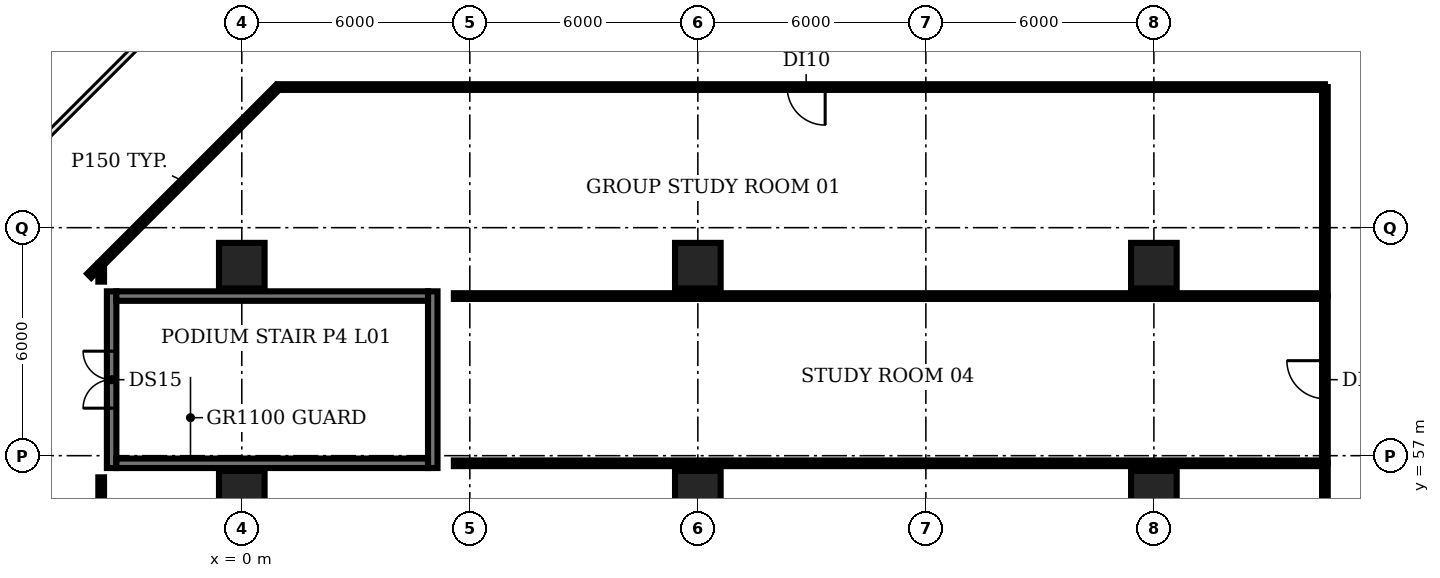
"""IFC4 building model, lengths in metres.
Left out: names, types, materials, properties, quantities, classifications, styles, units other than length and angle.
Written with IfcOpenShell. Run it as: python <this file> out.ifc"""

import sys

from ifc_helpers import new_model, si_unit, direction, frame, frame_2d, origin, origin_2d, place, context, subcontext, project, spatial, rectangle, extrude, element, fill, save


model = new_model("IFC4")
c1 = context("Model", 3, precision=1e-05, world=origin(), true_north=direction((0.0, 1.0)))
c2 = subcontext(c1, "Body", "Model", "MODEL_VIEW")
j1 = project(units=[si_unit("LENGTHUNIT", "METRE"), si_unit("PLANEANGLEUNIT", "RADIAN")], contexts=[c1])
p1 = place(None, origin())
s1 = spatial("IfcSite", under=j1, at=p1, CompositionType="ELEMENT")
p2 = place(p1, origin())
s2 = spatial("IfcBuilding", under=s1, at=p2, CompositionType="ELEMENT")
p3 = place(p2, frame((0.0, 0.0, 6.0)))
s3 = spatial("IfcBuildingStorey", under=s2, at=p3, CompositionType="ELEMENT", Elevation=6.0)
for number, where, z_axis, x_axis in (
    (1, (0.0, 56.0, 0.0), (0.0, 0.0, 1.0), (1.0, 0.0, 0.0)),
    (2, (0.0, 62.0, 0.0), (0.0, 0.0, 1.0), (1.0, 0.0, 0.0)),
    (3, (12.0, 56.0, 0.0), (0.0, 0.0, 1.0), (1.0, 0.0, 0.0)),
    (4, (12.0, 62.0, 0.0), (0.0, 0.0, 1.0), (1.0, 0.0, 0.0)),
    (5, (24.0, 56.0, 0.0), (0.0, 0.0, 1.0), (1.0, 0.0, 0.0)),
    (6, (24.0, 62.0, 0.0), (0.0, 0.0, 1.0), (1.0, 0.0, 0.0)),
):
    element("IfcColumn", number, at=place(p3, frame(where, z_axis=z_axis, x_axis=x_axis)), inside=s3, PredefinedType="COLUMN", context=c2, shape_type="SweptSolid", body=[
        extrude(rectangle(XDim=1.2, YDim=1.2, at=origin_2d()), origin(), (0.0, 0.0, 1.0), 4.6),
    ])
p4 = place(p3, frame((-3.425, 56.675, 0.0), z_axis=(0.0, 0.0, 1.0), x_axis=(0.0, 1.0, 0.0)))
e7 = element("IfcWall", 7, at=p4, inside=s3, PredefinedType="SHEAR", context=c2, shape_type="SweptSolid", body=[
    extrude(rectangle(XDim=4.65, YDim=0.25, at=frame_2d((2.325, 0.0))), origin(), (0.0, 0.0, 1.0), 4.6),
])
p5 = place(p4, frame((1.575, 0.0, 0.0)))
e8 = element("IfcOpeningElement", 8, at=p5, cuts=e7, PredefinedType="OPENING", context=c2, shape_type="SweptSolid", body=[
    extrude(rectangle(XDim=1.5, YDim=2.1, at=frame_2d((0.75, 1.05))), frame((0.0, 0.135, 0.0), z_axis=(0.0, -1.0, 0.0), x_axis=(1.0, 0.0, 0.0)), (0.0, 0.0, 1.0), 0.27),
])
p6 = place(p3, frame((5.025, 56.675, 0.0), z_axis=(0.0, 0.0, 1.0), x_axis=(0.0, 1.0, 0.0)))
e9 = element("IfcWall", 9, at=p6, inside=s3, PredefinedType="SHEAR", context=c2, shape_type="SweptSolid", body=[
    extrude(rectangle(XDim=4.65, YDim=0.25, at=frame_2d((2.325, 0.0))), origin(), (0.0, 0.0, 1.0), 4.6),
])
for number, where, z_axis, x_axis in (
    (10, (-3.3, 56.8, 0.0), (0.0, 0.0, 1.0), (1.0, 0.0, 0.0)),
    (11, (-3.3, 61.2, 0.0), (0.0, 0.0, 1.0), (1.0, 0.0, 0.0)),
):
    element("IfcWall", number, at=place(p3, frame(where, z_axis=z_axis, x_axis=x_axis)), inside=s3, PredefinedType="SHEAR", context=c2, shape_type="SweptSolid", body=[
        extrude(rectangle(XDim=8.2, YDim=0.25, at=frame_2d((4.1, 0.0))), origin(), (0.0, 0.0, 1.0), 4.6),
    ])
p7 = place(p3, frame((-4.013, 61.737, 0.0), z_axis=(0.0, 0.0, 1.0), x_axis=(0.707106781187, 0.707106781187, 0.0)))
e12 = element("IfcWall", 12, at=p7, inside=s3, PredefinedType="PARTITIONING", context=c2, shape_type="SweptSolid", body=[
    extrude(rectangle(XDim=7.019, YDim=0.15, at=frame_2d((3.51, 0.0))), origin(), (0.0, 0.0, 1.0), 3.18),
])
p8 = place(p3, frame((-3.7, 50.8, 0.0), z_axis=(0.0, 0.0, 1.0), x_axis=(0.0, 1.0, 0.0)))
e13 = element("IfcWall", 13, at=p8, inside=s3, PredefinedType="PARTITIONING", context=c2, shape_type="SweptSolid", body=[
    extrude(rectangle(XDim=5.63, YDim=0.15, at=frame_2d((2.815, 0.0))), origin(), (0.0, 0.0, 1.0), 3.18),
])
p9 = place(p3, frame((-3.7, 61.58, 0.0), z_axis=(0.0, 0.0, 1.0), x_axis=(0.0, 1.0, 0.0)))
e14 = element("IfcWall", 14, at=p9, inside=s3, PredefinedType="PARTITIONING", context=c2, shape_type="SweptSolid", body=[
    extrude(rectangle(XDim=0.47, YDim=0.15, at=frame_2d((0.235, 0.0))), origin(), (0.0, 0.0, 1.0), 3.18),
])
for number, where, z_axis, x_axis in (
    (15, (5.58, 56.8, 0.0), (0.0, 0.0, 1.0), (1.0, 0.0, 0.0)),
    (16, (5.58, 61.2, 0.0), (0.0, 0.0, 1.0), (1.0, 0.0, 0.0)),
):
    element("IfcWall", number, at=place(p3, frame(where, z_axis=z_axis, x_axis=x_axis)), inside=s3, PredefinedType="PARTITIONING", context=c2, shape_type="SweptSolid", body=[
        extrude(rectangle(XDim=22.92, YDim=0.15, at=frame_2d((11.46, 0.0))), origin(), (0.0, 0.0, 1.0), 3.18),
    ])
p10 = place(p3, frame((28.5, 50.8, 0.0), z_axis=(0.0, 0.0, 1.0), x_axis=(0.0, 1.0, 0.0)))
e17 = element("IfcWall", 17, at=p10, inside=s3, PredefinedType="PARTITIONING", context=c2, shape_type="SweptSolid", body=[
    extrude(rectangle(XDim=6.0, YDim=0.15, at=frame_2d((3.0, 0.0))), origin(), (0.0, 0.0, 1.0), 3.18),
])
p11 = place(p10, frame((2.4, 0.0, 0.0)))
e18 = element("IfcOpeningElement", 18, at=p11, cuts=e17, PredefinedType="OPENING", context=c2, shape_type="SweptSolid", body=[
    extrude(rectangle(XDim=1.0, YDim=2.1, at=frame_2d((0.5, 1.05))), frame((0.0, 0.085, 0.0), z_axis=(0.0, -1.0, 0.0), x_axis=(1.0, 0.0, 0.0)), (0.0, 0.0, 1.0), 0.17),
])
p12 = place(p3, frame((28.5, 56.8, 0.0), z_axis=(0.0, 0.0, 1.0), x_axis=(0.0, 1.0, 0.0)))
e19 = element("IfcWall", 19, at=p12, inside=s3, PredefinedType="PARTITIONING", context=c2, shape_type="SweptSolid", body=[
    extrude(rectangle(XDim=4.4, YDim=0.15, at=frame_2d((2.2, 0.0))), origin(), (0.0, 0.0, 1.0), 3.18),
])
p13 = place(p12, frame((1.7, 0.0, 0.0)))
e20 = element("IfcOpeningElement", 20, at=p13, cuts=e19, PredefinedType="OPENING", context=c2, shape_type="SweptSolid", body=[
    extrude(rectangle(XDim=1.0, YDim=2.1, at=frame_2d((0.5, 1.05))), frame((0.0, 0.085, 0.0), z_axis=(0.0, -1.0, 0.0), x_axis=(1.0, 0.0, 0.0)), (0.0, 0.0, 1.0), 0.17),
])
p14 = place(p3, frame((28.5, 61.2, 0.0), z_axis=(0.0, 0.0, 1.0), x_axis=(0.0, 1.0, 0.0)))
e21 = element("IfcWall", 21, at=p14, inside=s3, PredefinedType="PARTITIONING", context=c2, shape_type="SweptSolid", body=[
    extrude(rectangle(XDim=5.5, YDim=0.15, at=frame_2d((2.75, 0.0))), origin(), (0.0, 0.0, 1.0), 3.18),
])
p15 = place(p3, frame((28.5, 66.7, 0.0), z_axis=(0.0, 0.0, 1.0), x_axis=(-1.0, 0.0, 0.0)))
e22 = element("IfcWall", 22, at=p15, inside=s3, PredefinedType="PARTITIONING", context=c2, shape_type="SweptSolid", body=[
    extrude(rectangle(XDim=27.55, YDim=0.15, at=frame_2d((13.775, 0.0))), origin(), (0.0, 0.0, 1.0), 3.18),
])
p16 = place(p15, frame((13.15, 0.0, 0.0)))
e23 = element("IfcOpeningElement", 23, at=p16, cuts=e22, PredefinedType="OPENING", context=c2, shape_type="SweptSolid", body=[
    extrude(rectangle(XDim=1.0, YDim=2.1, at=frame_2d((0.5, 1.05))), frame((0.0, 0.085, 0.0), z_axis=(0.0, -1.0, 0.0), x_axis=(1.0, 0.0, 0.0)), (0.0, 0.0, 1.0), 0.17),
])
p17 = place(p5, origin())
e24 = element("IfcDoor", 24, at=p17, inside=s3, OperationType="DOUBLE_DOOR_SINGLE_SWING", PredefinedType="DOOR", context=c2, shape_type="SweptSolid", body=[
    extrude(rectangle(XDim=1.5, YDim=2.1, at=frame_2d((0.75, 1.05))), frame((0.0, 0.025, 0.0), z_axis=(0.0, -1.0, 0.0), x_axis=(1.0, 0.0, 0.0)), (0.0, 0.0, 1.0), 0.05),
])
fill(e8, e24)
p18 = place(p13, origin())
e25 = element("IfcDoor", 25, at=p18, inside=s3, OperationType="SINGLE_SWING_RIGHT", PredefinedType="DOOR", context=c2, shape_type="SweptSolid", body=[
    extrude(rectangle(XDim=1.0, YDim=2.1, at=frame_2d((0.5, 1.05))), frame((0.0, 0.025, 0.0), z_axis=(0.0, -1.0, 0.0), x_axis=(1.0, 0.0, 0.0)), (0.0, 0.0, 1.0), 0.05),
])
fill(e20, e25)
p19 = place(p16, origin())
e26 = element("IfcDoor", 26, at=p19, inside=s3, OperationType="SINGLE_SWING_LEFT", PredefinedType="DOOR", context=c2, shape_type="SweptSolid", body=[
    extrude(rectangle(XDim=1.0, YDim=2.1, at=frame_2d((0.5, 1.05))), frame((0.0, 0.025, 0.0), z_axis=(0.0, -1.0, 0.0), x_axis=(1.0, 0.0, 0.0)), (0.0, 0.0, 1.0), 0.05),
])
fill(e23, e26)
save(model, sys.argv[1])
